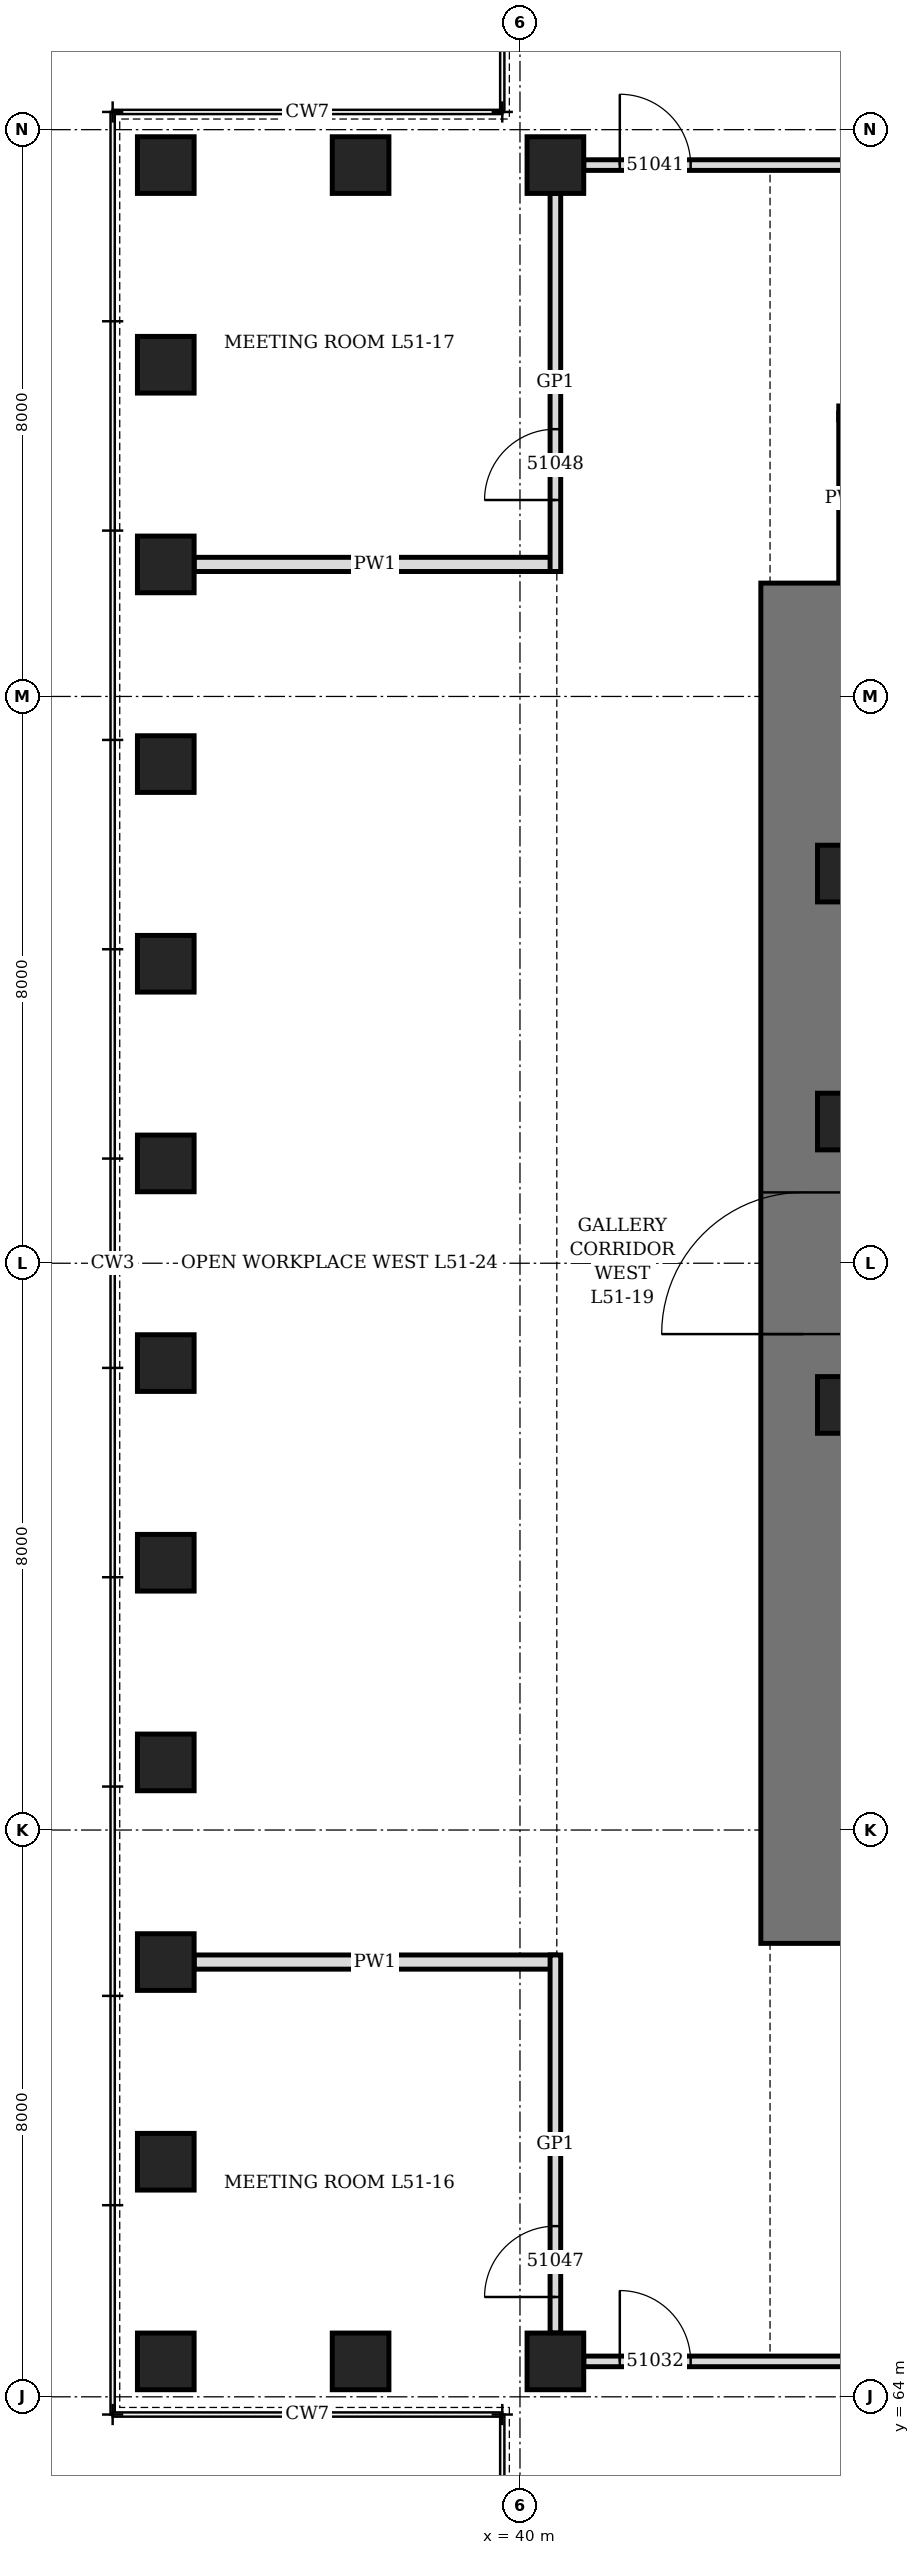
"""IFC4 building model, lengths in metres.
Left out: names, types, materials, properties, quantities, classifications, styles, units other than length and angle.
Written with IfcOpenShell. Run it as: python <this file> out.ifc"""

import sys

from ifc_helpers import new_model, si_unit, direction, frame, frame_2d, origin, origin_2d, place, context, subcontext, project, spatial, rectangle, hollow_rectangle, extrude, element, fill, save


model = new_model("IFC4")
c1 = context("Model", 3, precision=1e-05, world=origin(), true_north=direction((0.0, 1.0)))
c2 = subcontext(c1, "Body", "Model", "MODEL_VIEW")
j1 = project(units=[si_unit("LENGTHUNIT", "METRE"), si_unit("PLANEANGLEUNIT", "RADIAN")], contexts=[c1])
p1 = place(None, origin())
s1 = spatial("IfcSite", under=j1, at=p1, CompositionType="ELEMENT")
p2 = place(p1, origin())
s2 = spatial("IfcBuilding", under=s1, at=p2, CompositionType="ELEMENT")
p3 = place(p2, frame((0.0, 0.0, 227.5)))
s3 = spatial("IfcBuildingStorey", under=s2, at=p3, CompositionType="ELEMENT", Elevation=227.5)
for number, where, z_axis, x_axis in (
    (1, (40.5, 95.5, 0.0), (0.0, 0.0, 1.0), (1.0, 0.0, 0.0)),
    (2, (37.75, 95.5, 0.0), (0.0, 0.0, 1.0), (1.0, 0.0, 0.0)),
    (3, (35.0, 95.5, 0.0), (0.0, 0.0, 1.0), (0.0, 1.0, 0.0)),
    (4, (35.0, 92.682, 0.0), (0.0, 0.0, 1.0), (0.0, 1.0, 0.0)),
    (5, (35.0, 89.864, 0.0), (0.0, 0.0, 1.0), (0.0, 1.0, 0.0)),
    (6, (35.0, 87.045, 0.0), (0.0, 0.0, 1.0), (0.0, 1.0, 0.0)),
    (7, (35.0, 84.227, 0.0), (0.0, 0.0, 1.0), (0.0, 1.0, 0.0)),
    (8, (35.0, 81.409, 0.0), (0.0, 0.0, 1.0), (0.0, 1.0, 0.0)),
    (9, (35.0, 78.591, 0.0), (0.0, 0.0, 1.0), (0.0, 1.0, 0.0)),
    (10, (35.0, 75.773, 0.0), (0.0, 0.0, 1.0), (0.0, 1.0, 0.0)),
    (11, (35.0, 72.955, 0.0), (0.0, 0.0, 1.0), (0.0, 1.0, 0.0)),
    (12, (35.0, 70.136, 0.0), (0.0, 0.0, 1.0), (0.0, 1.0, 0.0)),
    (13, (35.0, 67.318, 0.0), (0.0, 0.0, 1.0), (0.0, 1.0, 0.0)),
    (14, (35.0, 64.5, 0.0), (0.0, 0.0, 1.0), (1.0, 0.0, 0.0)),
    (15, (37.75, 64.5, 0.0), (0.0, 0.0, 1.0), (1.0, 0.0, 0.0)),
    (16, (40.5, 64.5, 0.0), (0.0, 0.0, 1.0), (0.0, 1.0, 0.0)),
):
    element("IfcColumn", number, at=place(p3, frame(where, z_axis=z_axis, x_axis=x_axis)), inside=s3, PredefinedType="COLUMN", context=c2, shape_type="SweptSolid", body=[
        extrude(hollow_rectangle(XDim=0.8, YDim=0.8, WallThickness=0.08, at=origin_2d()), origin(), (0.0, 0.0, 1.0), 4.2),
    ])
p4 = place(p3, frame((44.0, 70.4, 0.0), z_axis=(0.0, 0.0, 1.0), x_axis=(0.0, 1.0, 0.0)))
e17 = element("IfcWall", 17, at=p4, inside=s3, PredefinedType="SHEAR", context=c2, shape_type="SweptSolid", body=[
    extrude(rectangle(XDim=19.2, YDim=1.2, at=frame_2d((9.6, 0.0))), origin(), (0.0, 0.0, 1.0), 4.2),
])
p5 = place(p4, frame((8.6, 0.0, 0.0)))
e18 = element("IfcOpeningElement", 18, at=p5, cuts=e17, PredefinedType="OPENING", context=c2, shape_type="SweptSolid", body=[
    extrude(rectangle(XDim=2.0, YDim=2.4, at=frame_2d((1.0, 1.2))), frame((0.0, 0.61, 0.0), z_axis=(0.0, -1.0, 0.0), x_axis=(1.0, 0.0, 0.0)), (0.0, 0.0, 1.0), 1.22),
])
for number, where, z_axis, x_axis in (
    (19, (44.6, 78.0, 0.0), (0.0, 0.0, 1.0), (1.0, 0.0, 0.0)),
    (20, (44.6, 82.0, 0.0), (0.0, 0.0, 1.0), (1.0, 0.0, 0.0)),
    (21, (44.6, 85.5, 0.0), (0.0, 0.0, 1.0), (1.0, 0.0, 0.0)),
):
    element("IfcColumn", number, at=place(p3, frame(where, z_axis=z_axis, x_axis=x_axis)), inside=s3, PredefinedType="COLUMN", context=c2, shape_type="SweptSolid", body=[
        extrude(hollow_rectangle(XDim=0.8, YDim=0.8, WallThickness=0.1, at=origin_2d()), origin(), (0.0, 0.0, 1.0), 4.2),
    ])
for number, where, z_axis, x_axis in (
    (22, (35.4, 70.136, 0.0), (0.0, 0.0, 1.0), (1.0, 0.0, 0.0)),
    (23, (35.4, 89.864, 0.0), (0.0, 0.0, 1.0), (1.0, 0.0, 0.0)),
):
    element("IfcWall", number, at=place(p3, frame(where, z_axis=z_axis, x_axis=x_axis)), inside=s3, PredefinedType="PARTITIONING", context=c2, shape_type="SweptSolid", body=[
        extrude(rectangle(XDim=5.1, YDim=0.2, at=frame_2d((2.55, 0.0))), origin(), (0.0, 0.0, 1.0), 3.428),
    ])
p6 = place(p3, frame((44.6, 89.6, 0.0), z_axis=(0.0, 0.0, 1.0), x_axis=(0.0, 1.0, 0.0)))
e24 = element("IfcWall", 24, at=p6, inside=s3, PredefinedType="PARTITIONING", context=c2, shape_type="SweptSolid", body=[
    extrude(rectangle(XDim=2.4, YDim=0.2, at=frame_2d((1.2, 0.0))), origin(), (0.0, 0.0, 1.0), 4.04),
])
p7 = place(p3, frame((40.9, 64.5, 0.0), z_axis=(0.0, 0.0, 1.0), x_axis=(1.0, 0.0, 0.0)))
e25 = element("IfcWall", 25, at=p7, inside=s3, PredefinedType="PARTITIONING", context=c2, shape_type="SweptSolid", body=[
    extrude(rectangle(XDim=27.782, YDim=0.15, at=frame_2d((13.891, 0.0))), origin(), (0.0, 0.0, 1.0), 4.04),
])
p8 = place(p7, frame((0.509, 0.0, 0.0)))
e26 = element("IfcOpeningElement", 26, at=p8, cuts=e25, PredefinedType="OPENING", context=c2, shape_type="SweptSolid", body=[
    extrude(rectangle(XDim=1.0, YDim=2.4, at=frame_2d((0.5, 1.2))), frame((0.0, 0.085, 0.0), z_axis=(0.0, -1.0, 0.0), x_axis=(1.0, 0.0, 0.0)), (0.0, 0.0, 1.0), 0.17),
])
p9 = place(p7, frame((6.146, 0.0, 0.0)))
e27 = element("IfcOpeningElement", 27, at=p9, cuts=e25, PredefinedType="OPENING", context=c2, shape_type="SweptSolid", body=[
    extrude(rectangle(XDim=1.0, YDim=2.1, at=frame_2d((0.5, 1.05))), frame((0.0, 0.085, 0.0), z_axis=(0.0, -1.0, 0.0), x_axis=(1.0, 0.0, 0.0)), (0.0, 0.0, 1.0), 0.17),
])
p10 = place(p7, frame((11.782, 0.0, 0.0)))
e28 = element("IfcOpeningElement", 28, at=p10, cuts=e25, PredefinedType="OPENING", context=c2, shape_type="SweptSolid", body=[
    extrude(rectangle(XDim=1.0, YDim=2.1, at=frame_2d((0.5, 1.05))), frame((0.0, 0.085, 0.0), z_axis=(0.0, -1.0, 0.0), x_axis=(1.0, 0.0, 0.0)), (0.0, 0.0, 1.0), 0.17),
])
p11 = place(p7, frame((17.418, 0.0, 0.0)))
e29 = element("IfcOpeningElement", 29, at=p11, cuts=e25, PredefinedType="OPENING", context=c2, shape_type="SweptSolid", body=[
    extrude(rectangle(XDim=1.0, YDim=2.1, at=frame_2d((0.5, 1.05))), frame((0.0, 0.085, 0.0), z_axis=(0.0, -1.0, 0.0), x_axis=(1.0, 0.0, 0.0)), (0.0, 0.0, 1.0), 0.17),
])
p12 = place(p7, frame((23.054, 0.0, 0.0)))
e30 = element("IfcOpeningElement", 30, at=p12, cuts=e25, PredefinedType="OPENING", context=c2, shape_type="SweptSolid", body=[
    extrude(rectangle(XDim=1.0, YDim=2.1, at=frame_2d((0.5, 1.05))), frame((0.0, 0.085, 0.0), z_axis=(0.0, -1.0, 0.0), x_axis=(1.0, 0.0, 0.0)), (0.0, 0.0, 1.0), 0.17),
])
p13 = place(p3, frame((44.5, 92.0, 0.0), z_axis=(0.0, 0.0, 1.0), x_axis=(1.0, 0.0, 0.0)))
e31 = element("IfcWall", 31, at=p13, inside=s3, PredefinedType="PARTITIONING", context=c2, shape_type="SweptSolid", body=[
    extrude(rectangle(XDim=6.4, YDim=0.2, at=frame_2d((3.2, 0.0))), origin(), (0.0, 0.0, 1.0), 4.04),
])
p14 = place(p13, frame((2.7, 0.0, 0.0)))
e32 = element("IfcOpeningElement", 32, at=p14, cuts=e31, PredefinedType="OPENING", context=c2, shape_type="SweptSolid", body=[
    extrude(rectangle(XDim=1.0, YDim=2.1, at=frame_2d((0.5, 1.05))), frame((0.0, 0.11, 0.0), z_axis=(0.0, -1.0, 0.0), x_axis=(1.0, 0.0, 0.0)), (0.0, 0.0, 1.0), 0.22),
])
p15 = place(p3, frame((40.9, 95.5, 0.0), z_axis=(0.0, 0.0, 1.0), x_axis=(1.0, 0.0, 0.0)))
e33 = element("IfcWall", 33, at=p15, inside=s3, PredefinedType="PARTITIONING", context=c2, shape_type="SweptSolid", body=[
    extrude(rectangle(XDim=27.782, YDim=0.15, at=frame_2d((13.891, 0.0))), origin(), (0.0, 0.0, 1.0), 4.04),
])
p16 = place(p15, frame((0.509, 0.0, 0.0)))
e34 = element("IfcOpeningElement", 34, at=p16, cuts=e33, PredefinedType="OPENING", context=c2, shape_type="SweptSolid", body=[
    extrude(rectangle(XDim=1.0, YDim=2.4, at=frame_2d((0.5, 1.2))), frame((0.0, 0.085, 0.0), z_axis=(0.0, -1.0, 0.0), x_axis=(1.0, 0.0, 0.0)), (0.0, 0.0, 1.0), 0.17),
])
p17 = place(p15, frame((6.146, 0.0, 0.0)))
e35 = element("IfcOpeningElement", 35, at=p17, cuts=e33, PredefinedType="OPENING", context=c2, shape_type="SweptSolid", body=[
    extrude(rectangle(XDim=1.0, YDim=2.1, at=frame_2d((0.5, 1.05))), frame((0.0, 0.085, 0.0), z_axis=(0.0, -1.0, 0.0), x_axis=(1.0, 0.0, 0.0)), (0.0, 0.0, 1.0), 0.17),
])
p18 = place(p15, frame((11.782, 0.0, 0.0)))
e36 = element("IfcOpeningElement", 36, at=p18, cuts=e33, PredefinedType="OPENING", context=c2, shape_type="SweptSolid", body=[
    extrude(rectangle(XDim=1.0, YDim=2.1, at=frame_2d((0.5, 1.05))), frame((0.0, 0.085, 0.0), z_axis=(0.0, -1.0, 0.0), x_axis=(1.0, 0.0, 0.0)), (0.0, 0.0, 1.0), 0.17),
])
p19 = place(p15, frame((17.418, 0.0, 0.0)))
e37 = element("IfcOpeningElement", 37, at=p19, cuts=e33, PredefinedType="OPENING", context=c2, shape_type="SweptSolid", body=[
    extrude(rectangle(XDim=1.0, YDim=2.1, at=frame_2d((0.5, 1.05))), frame((0.0, 0.085, 0.0), z_axis=(0.0, -1.0, 0.0), x_axis=(1.0, 0.0, 0.0)), (0.0, 0.0, 1.0), 0.17),
])
p20 = place(p15, frame((23.054, 0.0, 0.0)))
e38 = element("IfcOpeningElement", 38, at=p20, cuts=e33, PredefinedType="OPENING", context=c2, shape_type="SweptSolid", body=[
    extrude(rectangle(XDim=1.0, YDim=2.1, at=frame_2d((0.5, 1.05))), frame((0.0, 0.085, 0.0), z_axis=(0.0, -1.0, 0.0), x_axis=(1.0, 0.0, 0.0)), (0.0, 0.0, 1.0), 0.17),
])
p21 = place(p3, frame((40.5, 64.9, 0.0), z_axis=(0.0, 0.0, 1.0), x_axis=(0.0, 1.0, 0.0)))
e39 = element("IfcWall", 39, at=p21, inside=s3, PredefinedType="PARTITIONING", context=c2, shape_type="SweptSolid", body=[
    extrude(rectangle(XDim=5.336, YDim=0.15, at=frame_2d((2.668, 0.0))), origin(), (0.0, 0.0, 1.0), 4.04),
])
p22 = place(p21, frame((0.509, 0.0, 0.0)))
e40 = element("IfcOpeningElement", 40, at=p22, cuts=e39, PredefinedType="OPENING", context=c2, shape_type="SweptSolid", body=[
    extrude(rectangle(XDim=1.0, YDim=2.4, at=frame_2d((0.5, 1.2))), frame((0.0, 0.085, 0.0), z_axis=(0.0, -1.0, 0.0), x_axis=(1.0, 0.0, 0.0)), (0.0, 0.0, 1.0), 0.17),
])
p23 = place(p3, frame((40.5, 89.764, 0.0), z_axis=(0.0, 0.0, 1.0), x_axis=(0.0, 1.0, 0.0)))
e41 = element("IfcWall", 41, at=p23, inside=s3, PredefinedType="PARTITIONING", context=c2, shape_type="SweptSolid", body=[
    extrude(rectangle(XDim=5.336, YDim=0.15, at=frame_2d((2.668, 0.0))), origin(), (0.0, 0.0, 1.0), 4.04),
])
p24 = place(p23, frame((1.009, 0.0, 0.0)))
e42 = element("IfcOpeningElement", 42, at=p24, cuts=e41, PredefinedType="OPENING", context=c2, shape_type="SweptSolid", body=[
    extrude(rectangle(XDim=1.0, YDim=2.4, at=frame_2d((0.5, 1.2))), frame((0.0, 0.085, 0.0), z_axis=(0.0, -1.0, 0.0), x_axis=(1.0, 0.0, 0.0)), (0.0, 0.0, 1.0), 0.17),
])
p25 = place(p5, origin())
e43 = element("IfcDoor", 43, at=p25, inside=s3, OperationType="DOUBLE_DOOR_SINGLE_SWING", PredefinedType="DOOR", context=c2, shape_type="SweptSolid", body=[
    extrude(rectangle(XDim=2.0, YDim=2.4, at=frame_2d((1.0, 1.2))), frame((0.0, 0.35, 0.0), z_axis=(0.0, -1.0, 0.0), x_axis=(1.0, 0.0, 0.0)), (0.0, 0.0, 1.0), 0.7),
])
fill(e18, e43)
p26 = place(p8, origin())
e44 = element("IfcDoor", 44, at=p26, inside=s3, OperationType="SINGLE_SWING_RIGHT", PredefinedType="DOOR", context=c2, shape_type="SweptSolid", body=[
    extrude(rectangle(XDim=1.0, YDim=2.4, at=frame_2d((0.5, 1.2))), frame((0.0, 0.075, 0.0), z_axis=(0.0, -1.0, 0.0), x_axis=(1.0, 0.0, 0.0)), (0.0, 0.0, 1.0), 0.149),
])
fill(e26, e44)
p27 = place(p16, origin())
e45 = element("IfcDoor", 45, at=p27, inside=s3, OperationType="SINGLE_SWING_RIGHT", PredefinedType="DOOR", context=c2, shape_type="SweptSolid", body=[
    extrude(rectangle(XDim=1.0, YDim=2.4, at=frame_2d((0.5, 1.2))), frame((0.0, 0.075, 0.0), z_axis=(0.0, -1.0, 0.0), x_axis=(1.0, 0.0, 0.0)), (0.0, 0.0, 1.0), 0.149),
])
fill(e34, e45)
p28 = place(p22, origin())
e46 = element("IfcDoor", 46, at=p28, inside=s3, OperationType="SINGLE_SWING_RIGHT", PredefinedType="DOOR", context=c2, shape_type="SweptSolid", body=[
    extrude(rectangle(XDim=1.0, YDim=2.4, at=frame_2d((0.5, 1.2))), frame((0.0, 0.075, 0.0), z_axis=(0.0, -1.0, 0.0), x_axis=(1.0, 0.0, 0.0)), (0.0, 0.0, 1.0), 0.149),
])
fill(e40, e46)
p29 = place(p24, origin())
e47 = element("IfcDoor", 47, at=p29, inside=s3, OperationType="SINGLE_SWING_RIGHT", PredefinedType="DOOR", context=c2, shape_type="SweptSolid", body=[
    extrude(rectangle(XDim=1.0, YDim=2.4, at=frame_2d((0.5, 1.2))), frame((0.0, 0.075, 0.0), z_axis=(0.0, -1.0, 0.0), x_axis=(1.0, 0.0, 0.0)), (0.0, 0.0, 1.0), 0.149),
])
fill(e42, e47)
save(model, sys.argv[1])
